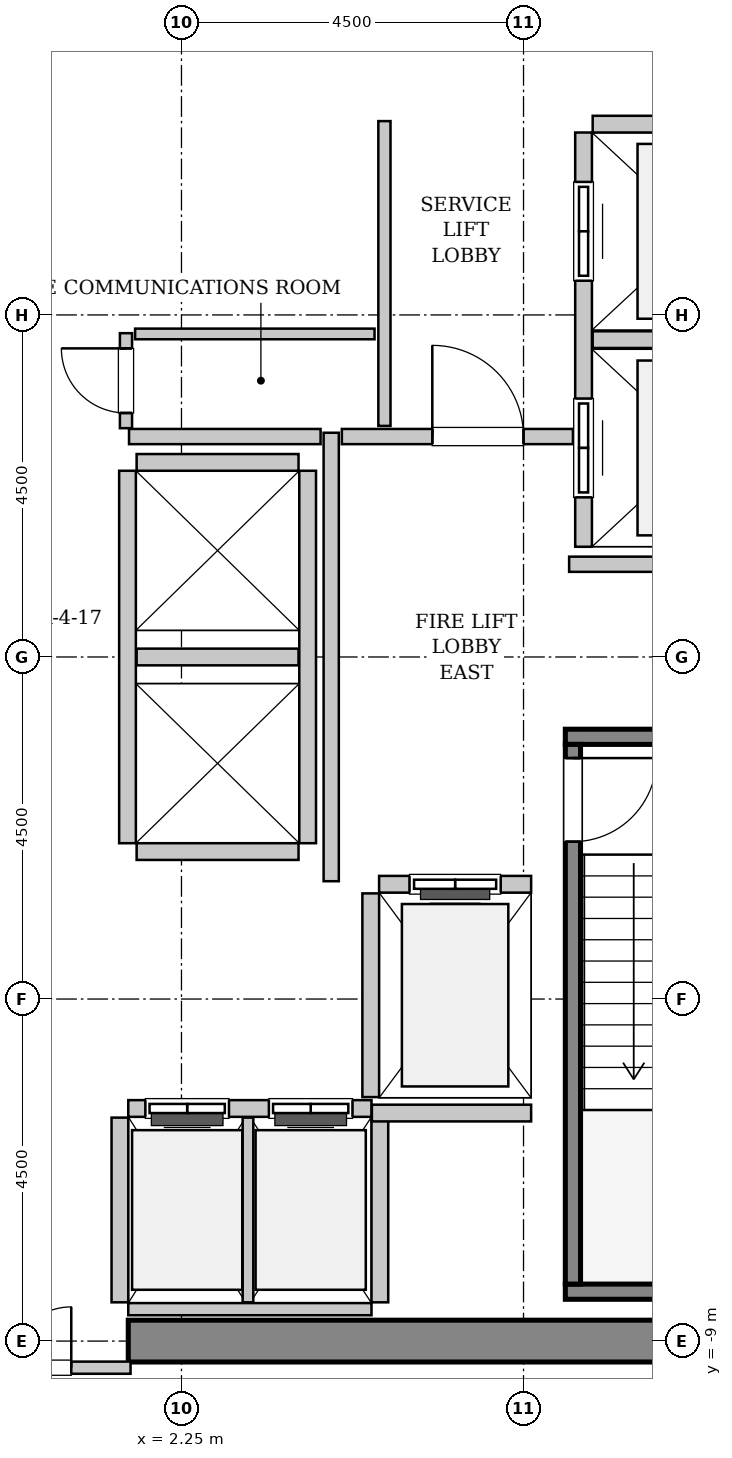
"""IFC4 building model, lengths in metres.
Left out: names, types, materials, properties, quantities, classifications, styles, units other than length and angle.
Written with IfcOpenShell. Run it as: python <this file> out.ifc"""

import sys

from ifc_helpers import new_model, si_unit, direction, frame, frame_2d, origin, place, context, subcontext, project, spatial, rectangle, extrude, source, transform, mapped, element, fill, save


model = new_model("IFC4")
c1 = context("Model", 3, precision=1e-05, world=origin(), true_north=direction((0.0, 1.0)))
c2 = subcontext(c1, "Body", "Model", "MODEL_VIEW")
j1 = project(units=[si_unit("LENGTHUNIT", "METRE"), si_unit("PLANEANGLEUNIT", "RADIAN")], contexts=[c1])
p1 = place(None, origin())
s1 = spatial("IfcSite", under=j1, at=p1, CompositionType="ELEMENT")
p2 = place(p1, origin())
s2 = spatial("IfcBuilding", under=s1, at=p2, CompositionType="ELEMENT")
p3 = place(p2, frame((0.0, 0.0, 202.0)))
s3 = spatial("IfcBuildingStorey", under=s2, at=p3, CompositionType="ELEMENT", Elevation=202.0)
m1 = source(origin(), c2, "Body", "SweptSolid", [
    extrude(rectangle(XDim=9.975, YDim=0.55, at=frame_2d((4.987, 0.0))), origin(), (0.0, 0.0, 1.0), 4.6),
])
p4 = place(p3, frame((1.55, -9.0, 0.0), z_axis=(0.0, 0.0, 1.0), x_axis=(1.0, 0.0, 0.0)))
e1 = element("IfcWall", 1, at=p4, inside=s3, PredefinedType="SHEAR", context=c2, shape_type="MappedRepresentation", body=[
    mapped(m1, transform((0.0, 0.0, 0.0), x_axis=(1.0, 0.0, 0.0), y_axis=(0.0, 1.0, 0.0), z_axis=(0.0, 0.0, 1.0), scale=1.0)),
])
m2 = source(origin(), c2, "Body", "SweptSolid", [
    extrude(rectangle(XDim=3.4, YDim=0.2, at=frame_2d((1.7, 0.0))), origin(), (0.0, 0.0, 1.0), 4.6),
])
p5 = place(p3, frame((7.3, -1.05, 0.0), z_axis=(0.0, 0.0, 1.0), x_axis=(1.0, 0.0, 0.0)))
e2 = element("IfcWall", 2, at=p5, inside=s3, PredefinedType="SOLIDWALL", context=c2, shape_type="MappedRepresentation", body=[
    mapped(m2, transform((0.0, 0.0, 0.0), x_axis=(1.0, 0.0, 0.0), y_axis=(0.0, 1.0, 0.0), z_axis=(0.0, 0.0, 1.0), scale=1.0)),
])
m3 = source(origin(), c2, "Body", "SweptSolid", [
    extrude(rectangle(XDim=3.68, YDim=0.2, at=frame_2d((1.84, 0.0))), origin(), (0.0, 0.0, 1.0), 4.6),
])
p6 = place(p3, frame((7.3, -8.35, 0.0), z_axis=(0.0, 0.0, 1.0), x_axis=(1.0, 0.0, 0.0)))
e3 = element("IfcWall", 3, at=p6, inside=s3, PredefinedType="SOLIDWALL", context=c2, shape_type="MappedRepresentation", body=[
    mapped(m3, transform((0.0, 0.0, 0.0), x_axis=(1.0, 0.0, 0.0), y_axis=(0.0, 1.0, 0.0), z_axis=(0.0, 0.0, 1.0), scale=1.0)),
])
m4 = source(origin(), c2, "Body", "SweptSolid", [
    extrude(rectangle(XDim=7.1, YDim=0.2, at=frame_2d((3.55, 0.0))), origin(), (0.0, 0.0, 1.0), 4.6),
])
p7 = place(p3, frame((7.4, -1.15, 0.0), z_axis=(0.0, 0.0, 1.0), x_axis=(0.0, -1.0, 0.0)))
e4 = element("IfcWall", 4, at=p7, inside=s3, PredefinedType="SOLIDWALL", context=c2, shape_type="MappedRepresentation", body=[
    mapped(m4, transform((0.0, 0.0, 0.0), x_axis=(1.0, 0.0, 0.0), y_axis=(0.0, 1.0, 0.0), z_axis=(0.0, 0.0, 1.0), scale=1.0)),
])
p8 = place(p7, frame((0.18, 0.0, 0.0)))
e5 = element("IfcOpeningElement", 5, at=p8, cuts=e4, PredefinedType="OPENING", context=c2, shape_type="SweptSolid", body=[
    extrude(rectangle(XDim=1.1, YDim=2.15, at=frame_2d((0.55, 1.075))), frame((0.0, 0.11, 0.0), z_axis=(0.0, -1.0, 0.0), x_axis=(1.0, 0.0, 0.0)), (0.0, 0.0, 1.0), 0.22),
])
m5 = source(origin(), c2, "Body", "SweptSolid", [
    extrude(rectangle(XDim=2.0, YDim=0.22, at=frame_2d((1.0, 0.0))), origin(), (0.0, 0.0, 1.0), 4.335),
])
p9 = place(p3, frame((6.85, -2.99, 0.0), z_axis=(0.0, 0.0, 1.0), x_axis=(-1.0, 0.0, 0.0)))
e6 = element("IfcWall", 6, at=p9, inside=s3, PredefinedType="SOLIDWALL", context=c2, shape_type="MappedRepresentation", body=[
    mapped(m5, transform((0.0, 0.0, 0.0), x_axis=(1.0, 0.0, 0.0), y_axis=(0.0, 1.0, 0.0), z_axis=(0.0, 0.0, 1.0), scale=1.0)),
])
p10 = place(p9, frame((0.4, 0.0, 0.0)))
e7 = element("IfcOpeningElement", 7, at=p10, cuts=e6, PredefinedType="OPENING", context=c2, shape_type="SweptSolid", body=[
    extrude(rectangle(XDim=1.2, YDim=2.2, at=frame_2d((0.6, 1.1))), frame((0.0, 0.12, 0.0), z_axis=(0.0, -1.0, 0.0), x_axis=(1.0, 0.0, 0.0)), (0.0, 0.0, 1.0), 0.24),
])
m6 = source(origin(), c2, "Body", "SweptSolid", [
    extrude(rectangle(XDim=2.68, YDim=0.22, at=frame_2d((1.34, 0.0))), origin(), (0.0, 0.0, 1.0), 4.335),
])
p11 = place(p3, frame((4.74, -3.11, 0.0), z_axis=(0.0, 0.0, 1.0), x_axis=(0.0, -1.0, 0.0)))
e8 = element("IfcWall", 8, at=p11, inside=s3, PredefinedType="SOLIDWALL", context=c2, shape_type="MappedRepresentation", body=[
    mapped(m6, transform((0.0, 0.0, 0.0), x_axis=(1.0, 0.0, 0.0), y_axis=(0.0, 1.0, 0.0), z_axis=(0.0, 0.0, 1.0), scale=1.0)),
])
m7 = source(origin(), c2, "Body", "SweptSolid", [
    extrude(rectangle(XDim=5.45, YDim=0.22, at=frame_2d((2.725, 0.0))), origin(), (0.0, 0.0, 1.0), 4.335),
])
p12 = place(p3, frame((7.54, 6.9, 0.0), z_axis=(0.0, 0.0, 1.0), x_axis=(0.0, -1.0, 0.0)))
e9 = element("IfcWall", 9, at=p12, inside=s3, PredefinedType="SOLIDWALL", context=c2, shape_type="MappedRepresentation", body=[
    mapped(m7, transform((0.0, 0.0, 0.0), x_axis=(1.0, 0.0, 0.0), y_axis=(0.0, 1.0, 0.0), z_axis=(0.0, 0.0, 1.0), scale=1.0)),
])
p13 = place(p12, frame((3.5, 0.0, 0.0)))
e10 = element("IfcOpeningElement", 10, at=p13, cuts=e9, PredefinedType="OPENING", context=c2, shape_type="SweptSolid", body=[
    extrude(rectangle(XDim=1.3, YDim=2.3, at=frame_2d((0.65, 1.15))), frame((0.0, 0.12, 0.0), z_axis=(0.0, -1.0, 0.0), x_axis=(1.0, 0.0, 0.0)), (0.0, 0.0, 1.0), 0.24),
])
p14 = place(p12, frame((0.65, 0.0, 0.0)))
e11 = element("IfcOpeningElement", 11, at=p14, cuts=e9, PredefinedType="OPENING", context=c2, shape_type="SweptSolid", body=[
    extrude(rectangle(XDim=1.3, YDim=2.3, at=frame_2d((0.65, 1.15))), frame((0.0, 0.12, 0.0), z_axis=(0.0, -1.0, 0.0), x_axis=(1.0, 0.0, 0.0)), (0.0, 0.0, 1.0), 0.24),
])
m8 = source(origin(), c2, "Body", "SweptSolid", [
    extrude(rectangle(XDim=2.78, YDim=0.22, at=frame_2d((1.39, 0.0))), origin(), (0.0, 0.0, 1.0), 4.335),
])
for number, where, z_axis, x_axis in (
    (12, (7.66, 4.175, 0.0), (0.0, 0.0, 1.0), (1.0, 0.0, 0.0)),
    (13, (10.44, 7.01, 0.0), (0.0, 0.0, 1.0), (-1.0, 0.0, 0.0)),
):
    element("IfcWall", number, at=place(p3, frame(where, z_axis=z_axis, x_axis=x_axis)), inside=s3, PredefinedType="SOLIDWALL", context=c2, shape_type="MappedRepresentation", body=[
        mapped(m8, transform((0.0, 0.0, 0.0), x_axis=(1.0, 0.0, 0.0), y_axis=(0.0, 1.0, 0.0), z_axis=(0.0, 0.0, 1.0), scale=1.0)),
    ])
m9 = source(origin(), c2, "Body", "SweptSolid", [
    extrude(rectangle(XDim=3.2, YDim=0.22, at=frame_2d((1.6, 0.0))), origin(), (0.0, 0.0, 1.0), 4.335),
])
p15 = place(p3, frame((4.75, -5.94, 0.0), z_axis=(0.0, 0.0, 1.0), x_axis=(-1.0, 0.0, 0.0)))
e14 = element("IfcWall", 14, at=p15, inside=s3, PredefinedType="SOLIDWALL", context=c2, shape_type="MappedRepresentation", body=[
    mapped(m9, transform((0.0, 0.0, 0.0), x_axis=(1.0, 0.0, 0.0), y_axis=(0.0, 1.0, 0.0), z_axis=(0.0, 0.0, 1.0), scale=1.0)),
])
p16 = place(p15, frame((1.875, 0.0, 0.0)))
e15 = element("IfcOpeningElement", 15, at=p16, cuts=e14, PredefinedType="OPENING", context=c2, shape_type="SweptSolid", body=[
    extrude(rectangle(XDim=1.1, YDim=2.2, at=frame_2d((0.55, 1.1))), frame((0.0, 0.12, 0.0), z_axis=(0.0, -1.0, 0.0), x_axis=(1.0, 0.0, 0.0)), (0.0, 0.0, 1.0), 0.24),
])
p17 = place(p15, frame((0.25, 0.0, 0.0)))
e16 = element("IfcOpeningElement", 16, at=p17, cuts=e14, PredefinedType="OPENING", context=c2, shape_type="SweptSolid", body=[
    extrude(rectangle(XDim=1.1, YDim=2.2, at=frame_2d((0.55, 1.1))), frame((0.0, 0.12, 0.0), z_axis=(0.0, -1.0, 0.0), x_axis=(1.0, 0.0, 0.0)), (0.0, 0.0, 1.0), 0.24),
])
m10 = source(origin(), c2, "Body", "SweptSolid", [
    extrude(rectangle(XDim=3.2, YDim=0.16, at=frame_2d((1.6, 0.0))), origin(), (0.0, 0.0, 1.0), 3.225),
])
p18 = place(p3, frame((1.55, -8.58, 0.0), z_axis=(0.0, 0.0, 1.0), x_axis=(1.0, 0.0, 0.0)))
e17 = element("IfcWall", 17, at=p18, inside=s3, PredefinedType="PARTITIONING", context=c2, shape_type="MappedRepresentation", body=[
    mapped(m10, transform((0.0, 0.0, 0.0), x_axis=(1.0, 0.0, 0.0), y_axis=(0.0, 1.0, 0.0), z_axis=(0.0, 0.0, 1.0), scale=1.0)),
])
m11 = source(origin(), c2, "Body", "SweptSolid", [
    extrude(rectangle(XDim=2.43, YDim=0.22, at=frame_2d((1.215, 0.0))), origin(), (0.0, 0.0, 1.0), 4.335),
])
p19 = place(p3, frame((1.44, -6.06, 0.0), z_axis=(0.0, 0.0, 1.0), x_axis=(0.0, -1.0, 0.0)))
e18 = element("IfcWall", 18, at=p19, inside=s3, PredefinedType="SOLIDWALL", context=c2, shape_type="MappedRepresentation", body=[
    mapped(m11, transform((0.0, 0.0, 0.0), x_axis=(1.0, 0.0, 0.0), y_axis=(0.0, 1.0, 0.0), z_axis=(0.0, 0.0, 1.0), scale=1.0)),
])
m12 = source(origin(), c2, "Body", "SweptSolid", [
    extrude(rectangle(XDim=2.43, YDim=0.14, at=frame_2d((1.215, 0.0))), origin(), (0.0, 0.0, 1.0), 4.335),
])
p20 = place(p3, frame((3.125, -8.49, 0.0), z_axis=(0.0, 0.0, 1.0), x_axis=(0.0, 1.0, 0.0)))
e19 = element("IfcWall", 19, at=p20, inside=s3, PredefinedType="PARTITIONING", context=c2, shape_type="MappedRepresentation", body=[
    mapped(m12, transform((0.0, 0.0, 0.0), x_axis=(1.0, 0.0, 0.0), y_axis=(0.0, 1.0, 0.0), z_axis=(0.0, 0.0, 1.0), scale=1.0)),
])
p21 = place(p3, frame((4.86, -8.49, 0.0), z_axis=(0.0, 0.0, 1.0), x_axis=(0.0, 1.0, 0.0)))
e20 = element("IfcWall", 20, at=p21, inside=s3, PredefinedType="SOLIDWALL", context=c2, shape_type="MappedRepresentation", body=[
    mapped(m11, transform((0.0, 0.0, 0.0), x_axis=(1.0, 0.0, 0.0), y_axis=(0.0, 1.0, 0.0), z_axis=(0.0, 0.0, 1.0), scale=1.0)),
])
m13 = source(origin(), c2, "Body", "SweptSolid", [
    extrude(rectangle(XDim=4.9, YDim=0.22, at=frame_2d((2.45, 0.0))), origin(), (0.0, 0.0, 1.0), 4.335),
])
for number, where, z_axis, x_axis in (
    (21, (1.54, 2.45, 0.0), (0.0, 0.0, 1.0), (0.0, -1.0, 0.0)),
    (22, (3.91, -2.45, 0.0), (0.0, 0.0, 1.0), (0.0, 1.0, 0.0)),
):
    element("IfcWall", number, at=place(p3, frame(where, z_axis=z_axis, x_axis=x_axis)), inside=s3, PredefinedType="SOLIDWALL", context=c2, shape_type="MappedRepresentation", body=[
        mapped(m13, transform((0.0, 0.0, 0.0), x_axis=(1.0, 0.0, 0.0), y_axis=(0.0, 1.0, 0.0), z_axis=(0.0, 0.0, 1.0), scale=1.0)),
    ])
m14 = source(origin(), c2, "Body", "SweptSolid", [
    extrude(rectangle(XDim=2.13, YDim=0.22, at=frame_2d((1.065, 0.0))), origin(), (0.0, 0.0, 1.0), 4.335),
])
for number, where, z_axis, x_axis in (
    (23, (1.66, -2.56, 0.0), (0.0, 0.0, 1.0), (1.0, 0.0, 0.0)),
    (24, (1.66, 0.0, 0.0), (0.0, 0.0, 1.0), (1.0, 0.0, 0.0)),
    (25, (3.79, 2.56, 0.0), (0.0, 0.0, 1.0), (-1.0, 0.0, 0.0)),
):
    element("IfcWall", number, at=place(p3, frame(where, z_axis=z_axis, x_axis=x_axis)), inside=s3, PredefinedType="SOLIDWALL", context=c2, shape_type="MappedRepresentation", body=[
        mapped(m14, transform((0.0, 0.0, 0.0), x_axis=(1.0, 0.0, 0.0), y_axis=(0.0, 1.0, 0.0), z_axis=(0.0, 0.0, 1.0), scale=1.0)),
    ])
m15 = source(origin(), c2, "Body", "SweptSolid", [
    extrude(rectangle(XDim=2.095, YDim=0.22, at=frame_2d((1.048, 0.0))), origin(), (0.0, 0.0, 1.0), 4.335),
])
p22 = place(p3, frame((4.755, -6.0, 0.0), z_axis=(0.0, 0.0, 1.0), x_axis=(1.0, 0.0, 0.0)))
e26 = element("IfcWall", 26, at=p22, inside=s3, PredefinedType="SOLIDWALL", context=c2, shape_type="MappedRepresentation", body=[
    mapped(m15, transform((0.0, 0.0, 0.0), x_axis=(1.0, 0.0, 0.0), y_axis=(0.0, 1.0, 0.0), z_axis=(0.0, 0.0, 1.0), scale=1.0)),
])
m16 = source(origin(), c2, "Body", "SweptSolid", [
    extrude(rectangle(XDim=5.9, YDim=0.2, at=frame_2d((2.95, 0.0))), origin(), (0.0, 0.0, 1.0), 4.335),
])
p23 = place(p3, frame((4.22, -2.95, 0.0), z_axis=(0.0, 0.0, 1.0), x_axis=(0.0, 1.0, 0.0)))
e27 = element("IfcWall", 27, at=p23, inside=s3, PredefinedType="PARTITIONING", context=c2, shape_type="MappedRepresentation", body=[
    mapped(m16, transform((0.0, 0.0, 0.0), x_axis=(1.0, 0.0, 0.0), y_axis=(0.0, 1.0, 0.0), z_axis=(0.0, 0.0, 1.0), scale=1.0)),
])
m17 = source(origin(), c2, "Body", "SweptSolid", [
    extrude(rectangle(XDim=2.52, YDim=0.2, at=frame_2d((1.26, 0.0))), origin(), (0.0, 0.0, 1.0), 4.335),
])
p24 = place(p3, frame((1.56, 2.9, 0.0), z_axis=(0.0, 0.0, 1.0), x_axis=(1.0, 0.0, 0.0)))
e28 = element("IfcWall", 28, at=p24, inside=s3, PredefinedType="PARTITIONING", context=c2, shape_type="MappedRepresentation", body=[
    mapped(m17, transform((0.0, 0.0, 0.0), x_axis=(1.0, 0.0, 0.0), y_axis=(0.0, 1.0, 0.0), z_axis=(0.0, 0.0, 1.0), scale=1.0)),
])
m18 = source(origin(), c2, "Body", "SweptSolid", [
    extrude(rectangle(XDim=3.04, YDim=0.2, at=frame_2d((1.52, 0.0))), origin(), (0.0, 0.0, 1.0), 4.335),
])
p25 = place(p3, frame((4.36, 2.9, 0.0), z_axis=(0.0, 0.0, 1.0), x_axis=(1.0, 0.0, 0.0)))
e29 = element("IfcWall", 29, at=p25, inside=s3, PredefinedType="PARTITIONING", context=c2, shape_type="MappedRepresentation", body=[
    mapped(m18, transform((0.0, 0.0, 0.0), x_axis=(1.0, 0.0, 0.0), y_axis=(0.0, 1.0, 0.0), z_axis=(0.0, 0.0, 1.0), scale=1.0)),
])
p26 = place(p25, frame((1.19, 0.0, 0.0)))
e30 = element("IfcOpeningElement", 30, at=p26, cuts=e29, PredefinedType="OPENING", context=c2, shape_type="SweptSolid", body=[
    extrude(rectangle(XDim=1.2, YDim=2.15, at=frame_2d((0.6, 1.075))), frame((0.0, 0.11, 0.0), z_axis=(0.0, -1.0, 0.0), x_axis=(1.0, 0.0, 0.0)), (0.0, 0.0, 1.0), 0.22),
])
m19 = source(origin(), c2, "Body", "SweptSolid", [
    extrude(rectangle(XDim=4.11, YDim=0.2, at=frame_2d((2.055, 0.0))), origin(), (0.0, 0.0, 1.0), 4.335),
])
p27 = place(p3, frame((7.35, 1.22, 0.0), z_axis=(0.0, 0.0, 1.0), x_axis=(1.0, 0.0, 0.0)))
e31 = element("IfcWall", 31, at=p27, inside=s3, PredefinedType="PARTITIONING", context=c2, shape_type="MappedRepresentation", body=[
    mapped(m19, transform((0.0, 0.0, 0.0), x_axis=(1.0, 0.0, 0.0), y_axis=(0.0, 1.0, 0.0), z_axis=(0.0, 0.0, 1.0), scale=1.0)),
])
m20 = source(origin(), c2, "Body", "SweptSolid", [
    extrude(rectangle(XDim=3.16, YDim=0.16, at=frame_2d((1.58, 0.0))), origin(), (0.0, 0.0, 1.0), 3.225),
])
p28 = place(p3, frame((-1.58, -9.35, 0.0), z_axis=(0.0, 0.0, 1.0), x_axis=(1.0, 0.0, 0.0)))
e32 = element("IfcWall", 32, at=p28, inside=s3, PredefinedType="PARTITIONING", context=c2, shape_type="MappedRepresentation", body=[
    mapped(m20, transform((0.0, 0.0, 0.0), x_axis=(1.0, 0.0, 0.0), y_axis=(0.0, 1.0, 0.0), z_axis=(0.0, 0.0, 1.0), scale=1.0)),
])
p29 = place(p28, frame((0.78, 0.0, 0.0)))
e33 = element("IfcOpeningElement", 33, at=p29, cuts=e32, PredefinedType="OPENING", context=c2, shape_type="SweptSolid", body=[
    extrude(rectangle(XDim=1.6, YDim=2.3, at=frame_2d((0.8, 1.15))), frame((0.0, 0.09, 0.0), z_axis=(0.0, -1.0, 0.0), x_axis=(1.0, 0.0, 0.0)), (0.0, 0.0, 1.0), 0.18),
])
m21 = source(origin(), c2, "Body", "SweptSolid", [
    extrude(rectangle(XDim=4.01, YDim=0.16, at=frame_2d((2.005, 0.0))), origin(), (0.0, 0.0, 1.0), 4.335),
])
p30 = place(p3, frame((4.92, 3.04, 0.0), z_axis=(0.0, 0.0, 1.0), x_axis=(0.0, 1.0, 0.0)))
e34 = element("IfcWall", 34, at=p30, inside=s3, PredefinedType="PARTITIONING", context=c2, shape_type="MappedRepresentation", body=[
    mapped(m21, transform((0.0, 0.0, 0.0), x_axis=(1.0, 0.0, 0.0), y_axis=(0.0, 1.0, 0.0), z_axis=(0.0, 0.0, 1.0), scale=1.0)),
])
m22 = source(origin(), c2, "Body", "SweptSolid", [
    extrude(rectangle(XDim=1.25, YDim=0.16, at=frame_2d((0.625, 0.0))), origin(), (0.0, 0.0, 1.0), 4.335),
])
p31 = place(p3, frame((1.52, 3.01, 0.0), z_axis=(0.0, 0.0, 1.0), x_axis=(0.0, 1.0, 0.0)))
e35 = element("IfcWall", 35, at=p31, inside=s3, PredefinedType="PARTITIONING", context=c2, shape_type="MappedRepresentation", body=[
    mapped(m22, transform((0.0, 0.0, 0.0), x_axis=(1.0, 0.0, 0.0), y_axis=(0.0, 1.0, 0.0), z_axis=(0.0, 0.0, 1.0), scale=1.0)),
])
p32 = place(p31, frame((0.2, 0.0, 0.0)))
e36 = element("IfcOpeningElement", 36, at=p32, cuts=e35, PredefinedType="OPENING", context=c2, shape_type="SweptSolid", body=[
    extrude(rectangle(XDim=0.85, YDim=2.1, at=frame_2d((0.425, 1.05))), frame((0.0, 0.09, 0.0), z_axis=(0.0, -1.0, 0.0), x_axis=(1.0, 0.0, 0.0)), (0.0, 0.0, 1.0), 0.18),
])
m23 = source(origin(), c2, "Body", "SweptSolid", [
    extrude(rectangle(XDim=3.15, YDim=0.14, at=frame_2d((1.575, 0.0))), origin(), (0.0, 0.0, 1.0), 4.335),
])
p33 = place(p3, frame((1.64, 4.25, 0.0), z_axis=(0.0, 0.0, 1.0), x_axis=(1.0, 0.0, 0.0)))
e37 = element("IfcWall", 37, at=p33, inside=s3, PredefinedType="PARTITIONING", context=c2, shape_type="MappedRepresentation", body=[
    mapped(m23, transform((0.0, 0.0, 0.0), x_axis=(1.0, 0.0, 0.0), y_axis=(0.0, 1.0, 0.0), z_axis=(0.0, 0.0, 1.0), scale=1.0)),
])
m24 = source(origin(), c2, "Body", "SweptSolid", [
    extrude(rectangle(XDim=1.1, YDim=2.15, at=frame_2d((0.55, 1.075))), frame((0.0, 0.025, 0.0), z_axis=(0.0, -1.0, 0.0), x_axis=(1.0, 0.0, 0.0)), (0.0, 0.0, 1.0), 0.05),
])
p34 = place(p8, origin())
e38 = element("IfcDoor", 38, at=p34, inside=s3, OperationType="SINGLE_SWING_LEFT", PredefinedType="DOOR", context=c2, shape_type="MappedRepresentation", body=[
    mapped(m24, transform((0.0, 0.0, 0.0), x_axis=(1.0, 0.0, 0.0), y_axis=(0.0, 1.0, 0.0), z_axis=(0.0, 0.0, 1.0), scale=1.0)),
])
fill(e5, e38)
m25 = source(origin(), c2, "Body", "SweptSolid", [
    extrude(rectangle(XDim=1.2, YDim=2.2, at=frame_2d((0.6, 1.1))), frame((0.0, 0.025, 0.0), z_axis=(0.0, -1.0, 0.0), x_axis=(1.0, 0.0, 0.0)), (0.0, 0.0, 1.0), 0.05),
])
p35 = place(p10, origin())
e39 = element("IfcDoor", 39, at=p35, inside=s3, OperationType="SLIDING_TO_LEFT", PredefinedType="DOOR", context=c2, shape_type="MappedRepresentation", body=[
    mapped(m25, transform((0.0, 0.0, 0.0), x_axis=(1.0, 0.0, 0.0), y_axis=(0.0, 1.0, 0.0), z_axis=(0.0, 0.0, 1.0), scale=1.0)),
])
fill(e7, e39)
m26 = source(origin(), c2, "Body", "SweptSolid", [
    extrude(rectangle(XDim=1.3, YDim=2.3, at=frame_2d((0.65, 1.15))), frame((0.0, 0.025, 0.0), z_axis=(0.0, -1.0, 0.0), x_axis=(1.0, 0.0, 0.0)), (0.0, 0.0, 1.0), 0.05),
])
p36 = place(p13, origin())
e40 = element("IfcDoor", 40, at=p36, inside=s3, OperationType="SLIDING_TO_RIGHT", PredefinedType="DOOR", context=c2, shape_type="MappedRepresentation", body=[
    mapped(m26, transform((0.0, 0.0, 0.0), x_axis=(1.0, 0.0, 0.0), y_axis=(0.0, 1.0, 0.0), z_axis=(0.0, 0.0, 1.0), scale=1.0)),
])
fill(e10, e40)
p37 = place(p14, origin())
e41 = element("IfcDoor", 41, at=p37, inside=s3, OperationType="SLIDING_TO_RIGHT", PredefinedType="DOOR", context=c2, shape_type="MappedRepresentation", body=[
    mapped(m26, transform((0.0, 0.0, 0.0), x_axis=(1.0, 0.0, 0.0), y_axis=(0.0, 1.0, 0.0), z_axis=(0.0, 0.0, 1.0), scale=1.0)),
])
fill(e11, e41)
m27 = source(origin(), c2, "Body", "SweptSolid", [
    extrude(rectangle(XDim=1.1, YDim=2.2, at=frame_2d((0.55, 1.1))), frame((0.0, 0.025, 0.0), z_axis=(0.0, -1.0, 0.0), x_axis=(1.0, 0.0, 0.0)), (0.0, 0.0, 1.0), 0.05),
])
p38 = place(p16, origin())
e42 = element("IfcDoor", 42, at=p38, inside=s3, OperationType="DOUBLE_DOOR_SLIDING", PredefinedType="DOOR", context=c2, shape_type="MappedRepresentation", body=[
    mapped(m27, transform((0.0, 0.0, 0.0), x_axis=(1.0, 0.0, 0.0), y_axis=(0.0, 1.0, 0.0), z_axis=(0.0, 0.0, 1.0), scale=1.0)),
])
fill(e15, e42)
p39 = place(p17, origin())
e43 = element("IfcDoor", 43, at=p39, inside=s3, OperationType="DOUBLE_DOOR_SLIDING", PredefinedType="DOOR", context=c2, shape_type="MappedRepresentation", body=[
    mapped(m27, transform((0.0, 0.0, 0.0), x_axis=(1.0, 0.0, 0.0), y_axis=(0.0, 1.0, 0.0), z_axis=(0.0, 0.0, 1.0), scale=1.0)),
])
fill(e16, e43)
m28 = source(origin(), c2, "Body", "SweptSolid", [
    extrude(rectangle(XDim=1.2, YDim=2.15, at=frame_2d((0.6, 1.075))), frame((0.0, 0.025, 0.0), z_axis=(0.0, -1.0, 0.0), x_axis=(1.0, 0.0, 0.0)), (0.0, 0.0, 1.0), 0.05),
])
p40 = place(p26, origin())
e44 = element("IfcDoor", 44, at=p40, inside=s3, OperationType="SINGLE_SWING_LEFT", PredefinedType="DOOR", context=c2, shape_type="MappedRepresentation", body=[
    mapped(m28, transform((0.0, 0.0, 0.0), x_axis=(1.0, 0.0, 0.0), y_axis=(0.0, 1.0, 0.0), z_axis=(0.0, 0.0, 1.0), scale=1.0)),
])
fill(e30, e44)
m29 = source(origin(), c2, "Body", "SweptSolid", [
    extrude(rectangle(XDim=1.6, YDim=2.3, at=frame_2d((0.8, 1.15))), frame((0.0, 0.025, 0.0), z_axis=(0.0, -1.0, 0.0), x_axis=(1.0, 0.0, 0.0)), (0.0, 0.0, 1.0), 0.05),
])
p41 = place(p29, origin())
e45 = element("IfcDoor", 45, at=p41, inside=s3, OperationType="DOUBLE_DOOR_SINGLE_SWING", PredefinedType="DOOR", context=c2, shape_type="MappedRepresentation", body=[
    mapped(m29, transform((0.0, 0.0, 0.0), x_axis=(1.0, 0.0, 0.0), y_axis=(0.0, 1.0, 0.0), z_axis=(0.0, 0.0, 1.0), scale=1.0)),
])
fill(e33, e45)
m30 = source(origin(), c2, "Body", "SweptSolid", [
    extrude(rectangle(XDim=0.85, YDim=2.1, at=frame_2d((0.425, 1.05))), frame((0.0, 0.025, 0.0), z_axis=(0.0, -1.0, 0.0), x_axis=(1.0, 0.0, 0.0)), (0.0, 0.0, 1.0), 0.05),
])
p42 = place(p32, origin())
e46 = element("IfcDoor", 46, at=p42, inside=s3, OperationType="SINGLE_SWING_RIGHT", PredefinedType="DOOR", context=c2, shape_type="MappedRepresentation", body=[
    mapped(m30, transform((0.0, 0.0, 0.0), x_axis=(1.0, 0.0, 0.0), y_axis=(0.0, 1.0, 0.0), z_axis=(0.0, 0.0, 1.0), scale=1.0)),
])
fill(e36, e46)
save(model, sys.argv[1])
